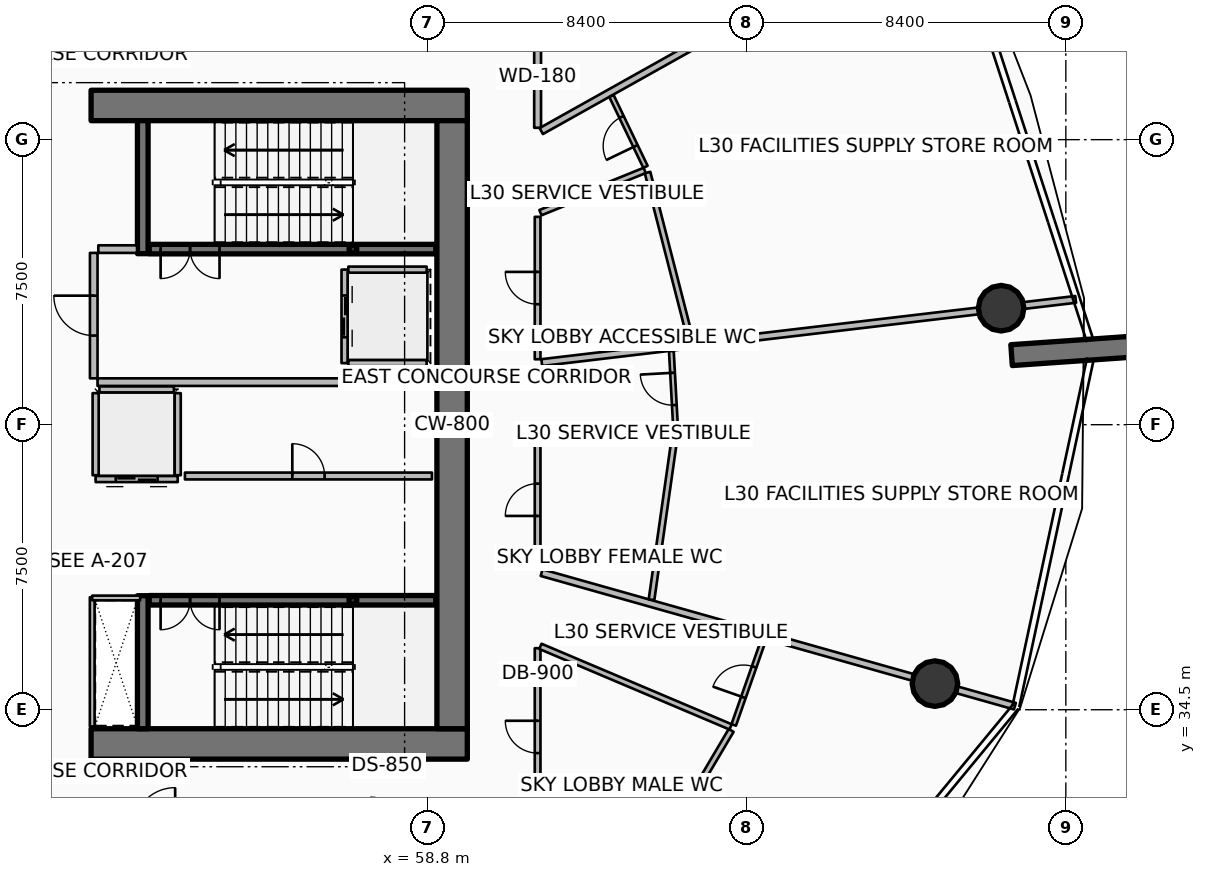
"""IFC4 building model, lengths in metres.
Left out: names, types, materials, properties, quantities, classifications, styles, units other than length and angle.
Written with IfcOpenShell. Run it as: python <this file> out.ifc"""

import sys

from ifc_helpers import new_model, si_unit, direction, frame, frame_2d, origin, origin_2d, place, context, subcontext, project, spatial, rectangle, hollow_rectangle, circle, extrude, element, fill, save


model = new_model("IFC4")
c1 = context("Model", 3, precision=1e-05, world=origin(), true_north=direction((0.0, 1.0)))
c2 = subcontext(c1, "Body", "Model", "MODEL_VIEW")
j1 = project(units=[si_unit("LENGTHUNIT", "METRE"), si_unit("PLANEANGLEUNIT", "RADIAN")], contexts=[c1])
p1 = place(None, origin())
s1 = spatial("IfcSite", under=j1, at=p1, CompositionType="ELEMENT")
p2 = place(p1, origin())
s2 = spatial("IfcBuilding", under=s1, at=p2, CompositionType="ELEMENT")
p3 = place(p2, frame((0.0, 0.0, 123.0)))
s3 = spatial("IfcBuildingStorey", under=s2, at=p3, CompositionType="ELEMENT", Elevation=123.0)
for number, where, z_axis, x_axis in (
    (1, (49.95, 33.6, 0.0), (0.0, 0.0, 1.0), (1.0, 0.0, 0.0)),
    (2, (49.95, 50.4, 0.0), (0.0, 0.0, 1.0), (1.0, 0.0, 0.0)),
):
    element("IfcWall", number, at=place(p3, frame(where, z_axis=z_axis, x_axis=x_axis)), inside=s3, PredefinedType="SHEAR", context=c2, shape_type="SweptSolid", body=[
        extrude(rectangle(XDim=9.9, YDim=0.8, at=frame_2d((4.95, 0.0))), origin(), (0.0, 0.0, 1.0), 4.8),
    ])
p4 = place(p3, frame((59.45, 34.0, 0.0), z_axis=(0.0, 0.0, 1.0), x_axis=(0.0, 1.0, 0.0)))
e3 = element("IfcWall", 3, at=p4, inside=s3, PredefinedType="SHEAR", context=c2, shape_type="SweptSolid", body=[
    extrude(rectangle(XDim=16.0, YDim=0.8, at=frame_2d((8.0, 0.0))), origin(), (0.0, 0.0, 1.0), 4.8),
])
for number, where, z_axis, x_axis in (
    (4, (51.31, 46.5, 0.0), (0.0, 0.0, 1.0), (0.0, 1.0, 0.0)),
    (5, (51.31, 34.0, 0.0), (0.0, 0.0, 1.0), (0.0, 1.0, 0.0)),
):
    element("IfcWall", number, at=place(p3, frame(where, z_axis=z_axis, x_axis=x_axis)), inside=s3, PredefinedType="SHEAR", context=c2, shape_type="SweptSolid", body=[
        extrude(rectangle(XDim=3.5, YDim=0.28, at=frame_2d((1.75, 0.0))), origin(), (0.0, 0.0, 1.0), 4.8),
    ])
for number, where, z_axis, x_axis in (
    (6, (56.84, 46.62, 0.0), (0.0, 0.0, 1.0), (1.0, 0.0, 0.0)),
    (7, (56.84, 37.38, 0.0), (0.0, 0.0, 1.0), (1.0, 0.0, 0.0)),
):
    element("IfcColumn", number, at=place(p3, frame(where, z_axis=z_axis, x_axis=x_axis)), inside=s3, PredefinedType="COLUMN", context=c2, shape_type="SweptSolid", body=[
        extrude(hollow_rectangle(XDim=0.2, YDim=0.2, WallThickness=0.01, InnerFilletRadius=0.01, OuterFilletRadius=0.02, at=origin_2d()), origin(), (0.0, 0.0, 1.0), 2.195),
    ])
p5 = place(p3, frame((74.172, 43.83, 0.0), z_axis=(0.0, 0.0, 1.0), x_axis=(0.997564163539, 0.069754853754, 0.0)))
e8 = element("IfcWall", 8, at=p5, inside=s3, PredefinedType="SOLIDWALL", context=c2, shape_type="SweptSolid", body=[
    extrude(rectangle(XDim=3.5, YDim=0.55, at=frame_2d((1.75, 0.0))), origin(), (0.0, 0.0, 1.0), 4.8),
])
p6 = place(p3, frame((72.156, 35.188, 0.0), z_axis=(-0.220171122763, 0.062064921505, 0.973484782737), x_axis=(-0.271319947566, -0.962489213473, 0.0)))
e9 = element("IfcColumn", 9, at=p6, inside=s3, PredefinedType="COLUMN", context=c2, shape_type="SweptSolid", body=[
    extrude(circle(Radius=0.6, at=origin_2d()), origin(), (0.0, 0.0, 1.0), 4.52),
])
p7 = place(p3, frame((73.897, 45.065, 0.0), z_axis=(-0.235611885109, -0.027868072432, 0.971447584862), x_axis=(0.117460782169, -0.993077521975, 0.0)))
e10 = element("IfcColumn", 10, at=p7, inside=s3, PredefinedType="COLUMN", context=c2, shape_type="SweptSolid", body=[
    extrude(circle(Radius=0.6, at=origin_2d()), origin(), (0.0, 0.0, 1.0), 4.529),
])
p8 = place(p3, frame((51.48, 46.62, 0.0), z_axis=(0.0, 0.0, 1.0), x_axis=(1.0, 0.0, 0.0)))
e11 = element("IfcWall", 11, at=p8, inside=s3, PredefinedType="SOLIDWALL", context=c2, shape_type="SweptSolid", body=[
    extrude(rectangle(XDim=7.54, YDim=0.25, at=frame_2d((3.77, 0.0))), origin(), (0.0, 0.0, 1.0), 4.4),
])
p9 = place(p8, frame((0.3, 0.0, 0.0)))
e12 = element("IfcOpeningElement", 12, at=p9, cuts=e11, PredefinedType="OPENING", context=c2, shape_type="SweptSolid", body=[
    extrude(rectangle(XDim=1.55, YDim=2.15, at=frame_2d((0.775, 1.075))), frame((0.0, 0.135, 0.0), z_axis=(0.0, -1.0, 0.0), x_axis=(1.0, 0.0, 0.0)), (0.0, 0.0, 1.0), 0.27),
])
p10 = place(p3, frame((51.48, 37.38, 0.0), z_axis=(0.0, 0.0, 1.0), x_axis=(1.0, 0.0, 0.0)))
e13 = element("IfcWall", 13, at=p10, inside=s3, PredefinedType="SOLIDWALL", context=c2, shape_type="SweptSolid", body=[
    extrude(rectangle(XDim=7.54, YDim=0.25, at=frame_2d((3.77, 0.0))), origin(), (0.0, 0.0, 1.0), 4.4),
])
p11 = place(p10, frame((0.3, 0.0, 0.0)))
e14 = element("IfcOpeningElement", 14, at=p11, cuts=e13, PredefinedType="OPENING", context=c2, shape_type="SweptSolid", body=[
    extrude(rectangle(XDim=1.55, YDim=2.15, at=frame_2d((0.775, 1.075))), frame((0.0, 0.135, 0.0), z_axis=(0.0, -1.0, 0.0), x_axis=(1.0, 0.0, 0.0)), (0.0, 0.0, 1.0), 0.27),
])
p12 = place(p3, frame((56.62, 46.08, 0.0), z_axis=(0.0, 0.0, 1.0), x_axis=(0.0, -1.0, 0.0)))
e15 = element("IfcWall", 15, at=p12, inside=s3, PredefinedType="PARTITIONING", context=c2, shape_type="SweptSolid", body=[
    extrude(rectangle(XDim=2.46, YDim=0.16, at=frame_2d((1.23, 0.0))), origin(), (0.0, 0.0, 1.0), 4.4),
])
p13 = place(p12, frame((0.68, 0.0, 0.0)))
e16 = element("IfcOpeningElement", 16, at=p13, cuts=e15, PredefinedType="OPENING", context=c2, shape_type="SweptSolid", body=[
    extrude(rectangle(XDim=1.1, YDim=2.1, at=frame_2d((0.55, 1.05))), frame((0.0, 0.09, 0.0), z_axis=(0.0, -1.0, 0.0), x_axis=(1.0, 0.0, 0.0)), (0.0, 0.0, 1.0), 0.18),
])
for number, where, z_axis, x_axis in (
    (17, (56.72, 46.08, 0.0), (0.0, 0.0, 1.0), (1.0, 0.0, 0.0)),
    (18, (56.72, 43.62, 0.0), (0.0, 0.0, 1.0), (1.0, 0.0, 0.0)),
):
    element("IfcWall", number, at=place(p3, frame(where, z_axis=z_axis, x_axis=x_axis)), inside=s3, PredefinedType="PARTITIONING", context=c2, shape_type="SweptSolid", body=[
        extrude(rectangle(XDim=2.06, YDim=0.16, at=frame_2d((1.03, 0.0))), origin(), (0.0, 0.0, 1.0), 4.4),
    ])
p14 = place(p3, frame((52.23, 40.57, 0.0), z_axis=(0.0, 0.0, 1.0), x_axis=(-1.0, 0.0, 0.0)))
e19 = element("IfcWall", 19, at=p14, inside=s3, PredefinedType="PARTITIONING", context=c2, shape_type="SweptSolid", body=[
    extrude(rectangle(XDim=2.16, YDim=0.16, at=frame_2d((1.08, 0.0))), origin(), (0.0, 0.0, 1.0), 4.4),
])
p15 = place(p14, frame((0.53, 0.0, 0.0)))
e20 = element("IfcOpeningElement", 20, at=p15, cuts=e19, PredefinedType="OPENING", context=c2, shape_type="SweptSolid", body=[
    extrude(rectangle(XDim=1.1, YDim=2.1, at=frame_2d((0.55, 1.05))), frame((0.0, 0.09, 0.0), z_axis=(0.0, -1.0, 0.0), x_axis=(1.0, 0.0, 0.0)), (0.0, 0.0, 1.0), 0.18),
])
for number, where, z_axis, x_axis in (
    (21, (52.23, 40.67, 0.0), (0.0, 0.0, 1.0), (0.0, 1.0, 0.0)),
    (22, (50.07, 40.67, 0.0), (0.0, 0.0, 1.0), (0.0, 1.0, 0.0)),
):
    element("IfcWall", number, at=place(p3, frame(where, z_axis=z_axis, x_axis=x_axis)), inside=s3, PredefinedType="PARTITIONING", context=c2, shape_type="SweptSolid", body=[
        extrude(rectangle(XDim=2.16, YDim=0.16, at=frame_2d((1.08, 0.0))), origin(), (0.0, 0.0, 1.0), 4.4),
    ])
p16 = place(p3, frame((50.17, 42.93, 0.0), z_axis=(0.0, 0.0, 1.0), x_axis=(1.0, 0.0, 0.0)))
e23 = element("IfcWall", 23, at=p16, inside=s3, PredefinedType="PARTITIONING", context=c2, shape_type="SweptSolid", body=[
    extrude(rectangle(XDim=1.96, YDim=0.16, at=frame_2d((0.98, 0.0))), origin(), (0.0, 0.0, 1.0), 4.4),
])
p17 = place(p3, frame((52.42, 40.65, 0.0), z_axis=(0.0, 0.0, 1.0), x_axis=(1.0, 0.0, 0.0)))
e24 = element("IfcWall", 24, at=p17, inside=s3, PredefinedType="PARTITIONING", context=c2, shape_type="SweptSolid", body=[
    extrude(rectangle(XDim=6.5, YDim=0.18, at=frame_2d((3.25, 0.0))), origin(), (0.0, 0.0, 1.0), 4.4),
])
p18 = place(p17, frame((2.825, 0.0, 0.0)))
e25 = element("IfcOpeningElement", 25, at=p18, cuts=e24, PredefinedType="OPENING", context=c2, shape_type="SweptSolid", body=[
    extrude(rectangle(XDim=0.85, YDim=2.06, at=frame_2d((0.425, 1.03))), frame((0.0, 0.1, 0.0), z_axis=(0.0, -1.0, 0.0), x_axis=(1.0, 0.0, 0.0)), (0.0, 0.0, 1.0), 0.2),
])
p19 = place(p3, frame((50.12, 43.12, 0.0), z_axis=(0.0, 0.0, 1.0), x_axis=(1.0, 0.0, 0.0)))
e26 = element("IfcWall", 26, at=p19, inside=s3, PredefinedType="PARTITIONING", context=c2, shape_type="SweptSolid", body=[
    extrude(rectangle(XDim=8.88, YDim=0.2, at=frame_2d((4.44, 0.0))), origin(), (0.0, 0.0, 1.0), 4.4),
])
p20 = place(p3, frame((50.14, 46.62, 0.0), z_axis=(0.0, 0.0, 1.0), x_axis=(1.0, 0.0, 0.0)))
e27 = element("IfcWall", 27, at=p20, inside=s3, PredefinedType="PARTITIONING", context=c2, shape_type="SweptSolid", body=[
    extrude(rectangle(XDim=1.02, YDim=0.2, at=frame_2d((0.51, 0.0))), origin(), (0.0, 0.0, 1.0), 4.4),
])
p21 = place(p3, frame((50.02, 43.22, 0.0), z_axis=(0.0, 0.0, 1.0), x_axis=(0.0, 1.0, 0.0)))
e28 = element("IfcWall", 28, at=p21, inside=s3, PredefinedType="PARTITIONING", context=c2, shape_type="SweptSolid", body=[
    extrude(rectangle(XDim=3.3, YDim=0.2, at=frame_2d((1.65, 0.0))), origin(), (0.0, 0.0, 1.0), 4.4),
])
p22 = place(p21, frame((1.125, 0.0, 0.0)))
e29 = element("IfcOpeningElement", 29, at=p22, cuts=e28, PredefinedType="OPENING", context=c2, shape_type="SweptSolid", body=[
    extrude(rectangle(XDim=1.05, YDim=2.1, at=frame_2d((0.525, 1.05))), frame((0.0, 0.11, 0.0), z_axis=(0.0, -1.0, 0.0), x_axis=(1.0, 0.0, 0.0)), (0.0, 0.0, 1.0), 0.22),
])
p23 = place(p3, frame((49.98, 34.06, 0.0), z_axis=(0.0, 0.0, 1.0), x_axis=(0.0, 1.0, 0.0)))
e30 = element("IfcWall", 30, at=p23, inside=s3, PredefinedType="PARTITIONING", context=c2, shape_type="SweptSolid", body=[
    extrude(rectangle(XDim=3.4, YDim=0.125, at=frame_2d((1.7, 0.0))), origin(), (0.0, 0.0, 1.0), 3.84),
])
p24 = place(p3, frame((49.98, 37.44, 0.0), z_axis=(0.0, 0.0, 1.0), x_axis=(1.0, 0.0, 0.0)))
e31 = element("IfcWall", 31, at=p24, inside=s3, PredefinedType="PARTITIONING", context=c2, shape_type="SweptSolid", body=[
    extrude(rectangle(XDim=1.26, YDim=0.125, at=frame_2d((0.63, 0.0))), origin(), (0.0, 0.0, 1.0), 3.84),
])
p25 = place(p3, frame((61.7, 49.812, 0.0), z_axis=(0.0, 0.0, 1.0), x_axis=(0.0, 1.0, 0.0)))
e32 = element("IfcWall", 32, at=p25, inside=s3, PredefinedType="PARTITIONING", context=c2, shape_type="SweptSolid", body=[
    extrude(rectangle(XDim=2.698, YDim=0.18, at=frame_2d((1.349, 0.0))), origin(), (0.0, 0.0, 1.0), 3.357),
])
p26 = place(p3, frame((61.796, 49.726, 0.0), z_axis=(0.0, 0.0, 1.0), x_axis=(0.872496493341, 0.488620373202, 0.0)))
e33 = element("IfcWall", 33, at=p26, inside=s3, PredefinedType="PARTITIONING", context=c2, shape_type="SweptSolid", body=[
    extrude(rectangle(XDim=12.241, YDim=0.18, at=frame_2d((6.121, 0.0))), origin(), (0.0, 0.0, 1.0), 3.357),
])
p27 = place(p3, frame((61.7, 31.45, 0.0), z_axis=(0.0, 0.0, 1.0), x_axis=(0.0, 1.0, 0.0)))
e34 = element("IfcWall", 34, at=p27, inside=s3, PredefinedType="PARTITIONING", context=c2, shape_type="SweptSolid", body=[
    extrude(rectangle(XDim=4.669, YDim=0.15, at=frame_2d((2.334, 0.0))), origin(), (0.0, 0.0, 1.0), 3.357),
])
p28 = place(p27, frame((1.909, 0.0, 0.0)))
e35 = element("IfcOpeningElement", 35, at=p28, cuts=e34, PredefinedType="OPENING", context=c2, shape_type="SweptSolid", body=[
    extrude(rectangle(XDim=0.85, YDim=2.06, at=frame_2d((0.425, 1.03))), frame((0.0, 0.085, 0.0), z_axis=(0.0, -1.0, 0.0), x_axis=(1.0, 0.0, 0.0)), (0.0, 0.0, 1.0), 0.17),
])
p29 = place(p3, frame((61.774, 36.167, 0.0), z_axis=(0.0, 0.0, 1.0), x_axis=(0.92084631933, -0.389925705971, 0.0)))
e36 = element("IfcWall", 36, at=p29, inside=s3, PredefinedType="PARTITIONING", context=c2, shape_type="SweptSolid", body=[
    extrude(rectangle(XDim=5.435, YDim=0.15, at=frame_2d((2.718, 0.0))), origin(), (0.0, 0.0, 1.0), 3.84),
])
p30 = place(p3, frame((64.113, 29.424, 0.0), z_axis=(0.0, 0.0, 1.0), x_axis=(0.509071384911, 0.860724302587, 0.0)))
e37 = element("IfcWall", 37, at=p30, inside=s3, PredefinedType="PARTITIONING", context=c2, shape_type="SweptSolid", body=[
    extrude(rectangle(XDim=5.265, YDim=0.15, at=frame_2d((2.633, 0.0))), origin(), (0.0, 0.0, 1.0), 3.357),
])
p31 = place(p3, frame((66.861, 34.1, 0.0), z_axis=(0.0, 0.0, 1.0), x_axis=(0.331397464859, 0.943491240174, 0.0)))
e38 = element("IfcWall", 38, at=p31, inside=s3, PredefinedType="PARTITIONING", context=c2, shape_type="SweptSolid", body=[
    extrude(rectangle(XDim=2.388, YDim=0.125, at=frame_2d((1.194, 0.0))), origin(), (0.0, 0.0, 1.0), 3.357),
])
p32 = place(p31, frame((0.769, 0.0, 0.0)))
e39 = element("IfcOpeningElement", 39, at=p32, cuts=e38, PredefinedType="OPENING", context=c2, shape_type="SweptSolid", body=[
    extrude(rectangle(XDim=0.85, YDim=2.06, at=frame_2d((0.425, 1.03))), frame((0.0, 0.073, 0.0), z_axis=(0.0, -1.0, 0.0), x_axis=(1.0, 0.0, 0.0)), (0.0, 0.0, 1.0), 0.145),
])
p33 = place(p3, frame((61.806, 38.106, 0.0), z_axis=(0.0, 0.0, 1.0), x_axis=(0.962458144132, -0.271430139803, 0.0)))
e40 = element("IfcWall", 40, at=p33, inside=s3, PredefinedType="PARTITIONING", context=c2, shape_type="SweptSolid", body=[
    extrude(rectangle(XDim=12.94, YDim=0.18, at=frame_2d((6.47, 0.0))), origin(), (0.0, 0.0, 1.0), 3.357),
])
p34 = place(p3, frame((61.7, 38.236, 0.0), z_axis=(0.0, 0.0, 1.0), x_axis=(0.0, 1.0, 0.0)))
e41 = element("IfcWall", 41, at=p34, inside=s3, PredefinedType="PARTITIONING", context=c2, shape_type="SweptSolid", body=[
    extrude(rectangle(XDim=3.576, YDim=0.15, at=frame_2d((1.788, 0.0))), origin(), (0.0, 0.0, 1.0), 3.357),
])
p35 = place(p34, frame((1.363, 0.0, 0.0)))
e42 = element("IfcOpeningElement", 42, at=p35, cuts=e41, PredefinedType="OPENING", context=c2, shape_type="SweptSolid", body=[
    extrude(rectangle(XDim=0.85, YDim=2.06, at=frame_2d((0.425, 1.03))), frame((0.0, 0.085, 0.0), z_axis=(0.0, -1.0, 0.0), x_axis=(1.0, 0.0, 0.0)), (0.0, 0.0, 1.0), 0.17),
])
p36 = place(p3, frame((61.78, 41.892, 0.0), z_axis=(0.0, 0.0, 1.0), x_axis=(0.999969368552, -0.007827001836, 0.0)))
e43 = element("IfcWall", 43, at=p36, inside=s3, PredefinedType="PARTITIONING", context=c2, shape_type="SweptSolid", body=[
    extrude(rectangle(XDim=3.493, YDim=0.15, at=frame_2d((1.747, 0.0))), origin(), (0.0, 0.0, 1.0), 3.84),
])
p37 = place(p3, frame((64.697, 37.394, 0.0), z_axis=(0.0, 0.0, 1.0), x_axis=(0.140920410112, 0.990020928069, 0.0)))
e44 = element("IfcWall", 44, at=p37, inside=s3, PredefinedType="PARTITIONING", context=c2, shape_type="SweptSolid", body=[
    extrude(rectangle(XDim=4.435, YDim=0.15, at=frame_2d((2.218, 0.0))), origin(), (0.0, 0.0, 1.0), 3.357),
])
p38 = place(p3, frame((65.329, 41.944, 0.0), z_axis=(0.0, 0.0, 1.0), x_axis=(-0.055023057536, 0.998485084085, 0.0)))
e45 = element("IfcWall", 45, at=p38, inside=s3, PredefinedType="PARTITIONING", context=c2, shape_type="SweptSolid", body=[
    extrude(rectangle(XDim=1.997, YDim=0.125, at=frame_2d((0.998, 0.0))), origin(), (0.0, 0.0, 1.0), 3.357),
])
p39 = place(p38, frame((0.573, 0.0, 0.0)))
e46 = element("IfcOpeningElement", 46, at=p39, cuts=e45, PredefinedType="OPENING", context=c2, shape_type="SweptSolid", body=[
    extrude(rectangle(XDim=0.85, YDim=2.06, at=frame_2d((0.425, 1.03))), frame((0.0, 0.073, 0.0), z_axis=(0.0, -1.0, 0.0), x_axis=(1.0, 0.0, 0.0)), (0.0, 0.0, 1.0), 0.145),
])
p40 = place(p3, frame((61.809, 43.635, 0.0), z_axis=(0.0, 0.0, 1.0), x_axis=(0.993069208245, 0.117531049668, 0.0)))
e47 = element("IfcWall", 47, at=p40, inside=s3, PredefinedType="PARTITIONING", context=c2, shape_type="SweptSolid", body=[
    extrude(rectangle(XDim=14.148, YDim=0.18, at=frame_2d((7.074, 0.0))), origin(), (0.0, 0.0, 1.0), 3.357),
])
p41 = place(p3, frame((61.7, 43.721, 0.0), z_axis=(0.0, 0.0, 1.0), x_axis=(0.0, 1.0, 0.0)))
e48 = element("IfcWall", 48, at=p41, inside=s3, PredefinedType="PARTITIONING", context=c2, shape_type="SweptSolid", body=[
    extrude(rectangle(XDim=3.748, YDim=0.15, at=frame_2d((1.874, 0.0))), origin(), (0.0, 0.0, 1.0), 3.357),
])
p42 = place(p41, frame((1.449, 0.0, 0.0)))
e49 = element("IfcOpeningElement", 49, at=p42, cuts=e48, PredefinedType="OPENING", context=c2, shape_type="SweptSolid", body=[
    extrude(rectangle(XDim=0.85, YDim=2.06, at=frame_2d((0.425, 1.03))), frame((0.0, 0.085, 0.0), z_axis=(0.0, -1.0, 0.0), x_axis=(1.0, 0.0, 0.0)), (0.0, 0.0, 1.0), 0.17),
])
p43 = place(p3, frame((61.774, 47.579, 0.0), z_axis=(0.0, 0.0, 1.0), x_axis=(0.926869613272, 0.375383430631, 0.0)))
e50 = element("IfcWall", 50, at=p43, inside=s3, PredefinedType="PARTITIONING", context=c2, shape_type="SweptSolid", body=[
    extrude(rectangle(XDim=2.96, YDim=0.15, at=frame_2d((1.48, 0.0))), origin(), (0.0, 0.0, 1.0), 3.84),
])
p44 = place(p3, frame((65.732, 44.198, 0.0), z_axis=(0.0, 0.0, 1.0), x_axis=(-0.248688220261, 0.968583589115, 0.0)))
e51 = element("IfcWall", 51, at=p44, inside=s3, PredefinedType="PARTITIONING", context=c2, shape_type="SweptSolid", body=[
    extrude(rectangle(XDim=4.581, YDim=0.15, at=frame_2d((2.29, 0.0))), origin(), (0.0, 0.0, 1.0), 3.357),
])
p45 = place(p3, frame((64.539, 48.785, 0.0), z_axis=(0.0, 0.0, 1.0), x_axis=(-0.432927014737, 0.901428976631, 0.0)))
e52 = element("IfcWall", 52, at=p45, inside=s3, PredefinedType="PARTITIONING", context=c2, shape_type="SweptSolid", body=[
    extrude(rectangle(XDim=2.066, YDim=0.125, at=frame_2d((1.033, 0.0))), origin(), (0.0, 0.0, 1.0), 3.357),
])
p46 = place(p45, frame((0.608, 0.0, 0.0)))
e53 = element("IfcOpeningElement", 53, at=p46, cuts=e52, PredefinedType="OPENING", context=c2, shape_type="SweptSolid", body=[
    extrude(rectangle(XDim=0.85, YDim=2.06, at=frame_2d((0.425, 1.03))), frame((0.0, 0.073, 0.0), z_axis=(0.0, -1.0, 0.0), x_axis=(1.0, 0.0, 0.0)), (0.0, 0.0, 1.0), 0.145),
])
p47 = place(p9, origin())
e54 = element("IfcDoor", 54, at=p47, inside=s3, OperationType="DOUBLE_DOOR_SINGLE_SWING", PredefinedType="DOOR", context=c2, shape_type="SweptSolid", body=[
    extrude(rectangle(XDim=1.55, YDim=2.15, at=frame_2d((0.775, 1.075))), frame((0.0, 0.025, 0.0), z_axis=(0.0, -1.0, 0.0), x_axis=(1.0, 0.0, 0.0)), (0.0, 0.0, 1.0), 0.05),
])
fill(e12, e54)
p48 = place(p11, origin())
e55 = element("IfcDoor", 55, at=p48, inside=s3, OperationType="DOUBLE_DOOR_SINGLE_SWING", PredefinedType="DOOR", context=c2, shape_type="SweptSolid", body=[
    extrude(rectangle(XDim=1.55, YDim=2.15, at=frame_2d((0.775, 1.075))), frame((0.0, 0.025, 0.0), z_axis=(0.0, -1.0, 0.0), x_axis=(1.0, 0.0, 0.0)), (0.0, 0.0, 1.0), 0.05),
])
fill(e14, e55)
p49 = place(p13, origin())
e56 = element("IfcDoor", 56, at=p49, inside=s3, OperationType="DOUBLE_DOOR_SLIDING", PredefinedType="DOOR", context=c2, shape_type="SweptSolid", body=[
    extrude(rectangle(XDim=1.1, YDim=2.1, at=frame_2d((0.55, 1.05))), frame((0.0, 0.025, 0.0), z_axis=(0.0, -1.0, 0.0), x_axis=(1.0, 0.0, 0.0)), (0.0, 0.0, 1.0), 0.05),
])
fill(e16, e56)
p50 = place(p15, origin())
e57 = element("IfcDoor", 57, at=p50, inside=s3, OperationType="DOUBLE_DOOR_SLIDING", PredefinedType="DOOR", context=c2, shape_type="SweptSolid", body=[
    extrude(rectangle(XDim=1.1, YDim=2.1, at=frame_2d((0.55, 1.05))), frame((0.0, 0.025, 0.0), z_axis=(0.0, -1.0, 0.0), x_axis=(1.0, 0.0, 0.0)), (0.0, 0.0, 1.0), 0.05),
])
fill(e20, e57)
p51 = place(p18, origin())
e58 = element("IfcDoor", 58, at=p51, inside=s3, OperationType="SINGLE_SWING_LEFT", PredefinedType="DOOR", context=c2, shape_type="SweptSolid", body=[
    extrude(rectangle(XDim=0.85, YDim=2.06, at=frame_2d((0.425, 1.03))), frame((0.0, 0.025, 0.0), z_axis=(0.0, -1.0, 0.0), x_axis=(1.0, 0.0, 0.0)), (0.0, 0.0, 1.0), 0.05),
])
fill(e25, e58)
p52 = place(p22, origin())
e59 = element("IfcDoor", 59, at=p52, inside=s3, OperationType="SINGLE_SWING_RIGHT", PredefinedType="DOOR", context=c2, shape_type="SweptSolid", body=[
    extrude(rectangle(XDim=1.05, YDim=2.1, at=frame_2d((0.525, 1.05))), frame((0.0, 0.025, 0.0), z_axis=(0.0, -1.0, 0.0), x_axis=(1.0, 0.0, 0.0)), (0.0, 0.0, 1.0), 0.05),
])
fill(e29, e59)
p53 = place(p28, origin())
e60 = element("IfcDoor", 60, at=p53, inside=s3, OperationType="SINGLE_SWING_RIGHT", PredefinedType="DOOR", context=c2, shape_type="SweptSolid", body=[
    extrude(rectangle(XDim=0.85, YDim=2.06, at=frame_2d((0.425, 1.03))), frame((0.0, 0.025, 0.0), z_axis=(0.0, -1.0, 0.0), x_axis=(1.0, 0.0, 0.0)), (0.0, 0.0, 1.0), 0.05),
])
fill(e35, e60)
p54 = place(p32, origin())
e61 = element("IfcDoor", 61, at=p54, inside=s3, OperationType="SINGLE_SWING_LEFT", PredefinedType="DOOR", context=c2, shape_type="SweptSolid", body=[
    extrude(rectangle(XDim=0.85, YDim=2.06, at=frame_2d((0.425, 1.03))), frame((0.0, 0.025, 0.0), z_axis=(0.0, -1.0, 0.0), x_axis=(1.0, 0.0, 0.0)), (0.0, 0.0, 1.0), 0.05),
])
fill(e39, e61)
p55 = place(p35, origin())
e62 = element("IfcDoor", 62, at=p55, inside=s3, OperationType="SINGLE_SWING_LEFT", PredefinedType="DOOR", context=c2, shape_type="SweptSolid", body=[
    extrude(rectangle(XDim=0.85, YDim=2.06, at=frame_2d((0.425, 1.03))), frame((0.0, 0.025, 0.0), z_axis=(0.0, -1.0, 0.0), x_axis=(1.0, 0.0, 0.0)), (0.0, 0.0, 1.0), 0.05),
])
fill(e42, e62)
p56 = place(p39, origin())
e63 = element("IfcDoor", 63, at=p56, inside=s3, OperationType="SINGLE_SWING_RIGHT", PredefinedType="DOOR", context=c2, shape_type="SweptSolid", body=[
    extrude(rectangle(XDim=0.85, YDim=2.06, at=frame_2d((0.425, 1.03))), frame((0.0, 0.025, 0.0), z_axis=(0.0, -1.0, 0.0), x_axis=(1.0, 0.0, 0.0)), (0.0, 0.0, 1.0), 0.05),
])
fill(e46, e63)
p57 = place(p42, origin())
e64 = element("IfcDoor", 64, at=p57, inside=s3, OperationType="SINGLE_SWING_RIGHT", PredefinedType="DOOR", context=c2, shape_type="SweptSolid", body=[
    extrude(rectangle(XDim=0.85, YDim=2.06, at=frame_2d((0.425, 1.03))), frame((0.0, 0.025, 0.0), z_axis=(0.0, -1.0, 0.0), x_axis=(1.0, 0.0, 0.0)), (0.0, 0.0, 1.0), 0.05),
])
fill(e49, e64)
p58 = place(p46, origin())
e65 = element("IfcDoor", 65, at=p58, inside=s3, OperationType="SINGLE_SWING_LEFT", PredefinedType="DOOR", context=c2, shape_type="SweptSolid", body=[
    extrude(rectangle(XDim=0.85, YDim=2.06, at=frame_2d((0.425, 1.03))), frame((0.0, 0.025, 0.0), z_axis=(0.0, -1.0, 0.0), x_axis=(1.0, 0.0, 0.0)), (0.0, 0.0, 1.0), 0.05),
])
fill(e53, e65)
save(model, sys.argv[1])
